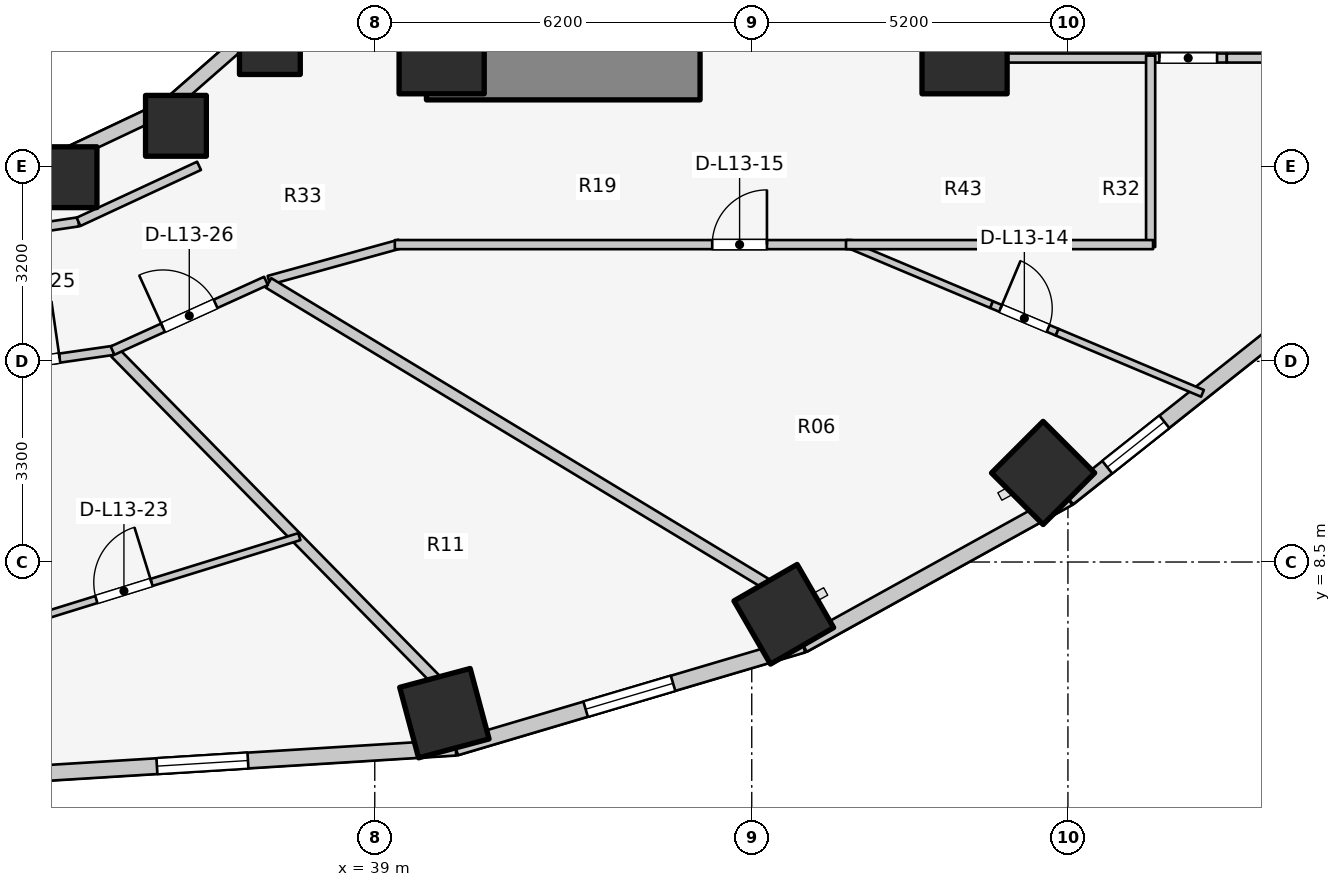
"""IFC4 building model, lengths in metres.
Left out: names, types, materials, properties, quantities, classifications, styles, units other than length and angle.
Written with IfcOpenShell. Run it as: python <this file> out.ifc"""

import sys

from ifc_helpers import new_model, si_unit, direction, frame, frame_2d, origin, origin_2d, place, context, subcontext, project, spatial, rectangle, extrude, element, fill, save


model = new_model("IFC4")
c1 = context("Model", 3, precision=1e-05, world=origin(), true_north=direction((0.0, 1.0)))
c2 = subcontext(c1, "Body", "Model", "MODEL_VIEW")
j1 = project(units=[si_unit("LENGTHUNIT", "METRE"), si_unit("PLANEANGLEUNIT", "RADIAN")], contexts=[c1])
p1 = place(None, origin())
s1 = spatial("IfcSite", under=j1, at=p1, CompositionType="ELEMENT")
p2 = place(p1, origin())
s2 = spatial("IfcBuilding", under=s1, at=p2, CompositionType="ELEMENT")
p3 = place(p2, frame((0.0, 0.0, 46.2)))
s3 = spatial("IfcBuildingStorey", under=s2, at=p3, CompositionType="ELEMENT", Elevation=46.2)
p4 = place(p3, frame((39.85, 16.55, 0.0), z_axis=(0.0, 0.0, 1.0), x_axis=(1.0, 0.0, 0.0)))
e1 = element("IfcWall", 1, at=p4, inside=s3, PredefinedType="SHEAR", context=c2, shape_type="SweptSolid", body=[
    extrude(rectangle(XDim=4.5, YDim=0.9, at=frame_2d((2.25, 0.0))), origin(), (0.0, 0.0, 1.0), 3.1),
])
for number, where, z_axis, x_axis in (
    (2, (40.1, 16.9, 0.0), (0.0, 0.0, 1.0), (1.0, 0.0, 0.0)),
    (3, (48.7, 16.9, 0.0), (0.0, 0.0, 1.0), (1.0, 0.0, 0.0)),
):
    element("IfcColumn", number, at=place(p3, frame(where, z_axis=z_axis, x_axis=x_axis)), inside=s3, PredefinedType="COLUMN", context=c2, shape_type="SweptSolid", body=[
        extrude(rectangle(XDim=1.4, YDim=1.4, at=origin_2d()), origin(), (0.0, 0.0, 1.0), 3.1),
    ])
p5 = place(p3, frame((33.931, 14.828, 0.0), z_axis=(0.0, 0.0, 1.0), x_axis=(1.0, 0.0, 0.0)))
e4 = element("IfcColumn", 4, at=p5, inside=s3, PredefinedType="COLUMN", context=c2, shape_type="SweptSolid", body=[
    extrude(rectangle(XDim=1.0, YDim=1.0, at=origin_2d()), origin(), (0.0, 0.0, 1.0), 3.1),
])
p6 = place(p3, frame((40.145, 6.014, 0.0), z_axis=(0.0, 0.0, 1.0), x_axis=(0.258819045103, -0.965925826289, 0.0)))
e5 = element("IfcColumn", 5, at=p6, inside=s3, PredefinedType="COLUMN", context=c2, shape_type="SweptSolid", body=[
    extrude(rectangle(XDim=1.2, YDim=1.2, at=origin_2d()), origin(), (0.0, 0.0, 1.0), 3.1),
])
p7 = place(p3, frame((35.73, 15.673, 0.0), z_axis=(0.0, 0.0, 1.0), x_axis=(1.0, 0.0, 0.0)))
e6 = element("IfcColumn", 6, at=p7, inside=s3, PredefinedType="COLUMN", context=c2, shape_type="SweptSolid", body=[
    extrude(rectangle(XDim=1.0, YDim=1.0, at=origin_2d()), origin(), (0.0, 0.0, 1.0), 3.1),
])
p8 = place(p3, frame((45.727, 7.641, 0.0), z_axis=(0.0, 0.0, 1.0), x_axis=(0.5, -0.866025403784, 0.0)))
e7 = element("IfcColumn", 7, at=p8, inside=s3, PredefinedType="COLUMN", context=c2, shape_type="SweptSolid", body=[
    extrude(rectangle(XDim=1.2, YDim=1.2, at=origin_2d()), origin(), (0.0, 0.0, 1.0), 3.1),
])
p9 = place(p3, frame((37.275, 17.018, 0.0), z_axis=(0.0, 0.0, 1.0), x_axis=(1.0, 0.0, 0.0)))
e8 = element("IfcColumn", 8, at=p9, inside=s3, PredefinedType="COLUMN", context=c2, shape_type="SweptSolid", body=[
    extrude(rectangle(XDim=1.0, YDim=1.0, at=origin_2d()), origin(), (0.0, 0.0, 1.0), 3.1),
])
p10 = place(p3, frame((49.992, 9.965, 0.0), z_axis=(0.0, 0.0, 1.0), x_axis=(0.707106781187, -0.707106781187, 0.0)))
e9 = element("IfcColumn", 9, at=p10, inside=s3, PredefinedType="COLUMN", context=c2, shape_type="SweptSolid", body=[
    extrude(rectangle(XDim=1.2, YDim=1.2, at=origin_2d()), origin(), (0.0, 0.0, 1.0), 3.1),
])
p11 = place(p3, frame((32.0, 14.88, 0.0), z_axis=(0.0, 0.0, 1.0), x_axis=(0.988901730308, 0.148571086668, 0.0)))
e10 = element("IfcWall", 10, at=p11, inside=s3, PredefinedType="STANDARD", context=c2, shape_type="SweptSolid", body=[
    extrude(rectangle(XDim=1.864, YDim=0.23, at=frame_2d((0.932, 0.0))), origin(), (0.0, 0.0, 1.0), 2.16),
])
p12 = place(p3, frame((33.843, 15.157, 0.0), z_axis=(0.0, 0.0, 1.0), x_axis=(0.904179699603, 0.427152280606, 0.0)))
e11 = element("IfcWall", 11, at=p12, inside=s3, PredefinedType="STANDARD", context=c2, shape_type="SweptSolid", body=[
    extrude(rectangle(XDim=1.899, YDim=0.23, at=frame_2d((0.95, 0.0))), origin(), (0.0, 0.0, 1.0), 2.16),
])
p13 = place(p3, frame((35.56, 15.968, 0.0), z_axis=(0.0, 0.0, 1.0), x_axis=(0.752576694707, 0.658504607869, 0.0)))
e12 = element("IfcWall", 12, at=p13, inside=s3, PredefinedType="STANDARD", context=c2, shape_type="SweptSolid", body=[
    extrude(rectangle(XDim=1.959, YDim=0.23, at=frame_2d((0.98, 0.0))), origin(), (0.0, 0.0, 1.0), 2.16),
])
p14 = place(p3, frame((32.0, 4.931, 0.0), z_axis=(0.0, 0.0, 1.0), x_axis=(0.998090514779, 0.061768311519, 0.0)))
e13 = element("IfcWall", 13, at=p14, inside=s3, PredefinedType="STANDARD", context=c2, shape_type="SweptSolid", body=[
    extrude(rectangle(XDim=8.348, YDim=0.26, at=frame_2d((4.174, 0.0))), origin(), (0.0, 0.0, 1.0), 2.85),
])
p15 = place(p14, frame((3.424, 0.0, 0.75)))
e14 = element("IfcOpeningElement", 14, at=p15, cuts=e13, PredefinedType="OPENING", context=c2, shape_type="SweptSolid", body=[
    extrude(rectangle(XDim=1.5, YDim=1.6, at=frame_2d((0.75, 0.8))), frame((0.0, 0.14, 0.0), z_axis=(0.0, -1.0, 0.0), x_axis=(1.0, 0.0, 0.0)), (0.0, 0.0, 1.0), 0.28),
])
p16 = place(p3, frame((40.332, 5.447, 0.0), z_axis=(0.0, 0.0, 1.0), x_axis=(0.958843593522, 0.283934786811, 0.0)))
e15 = element("IfcWall", 15, at=p16, inside=s3, PredefinedType="STANDARD", context=c2, shape_type="SweptSolid", body=[
    extrude(rectangle(XDim=5.955, YDim=0.26, at=frame_2d((2.978, 0.0))), origin(), (0.0, 0.0, 1.0), 2.85),
])
p17 = place(p16, frame((2.228, 0.0, 0.75)))
e16 = element("IfcOpeningElement", 16, at=p17, cuts=e15, PredefinedType="OPENING", context=c2, shape_type="SweptSolid", body=[
    extrude(rectangle(XDim=1.5, YDim=1.6, at=frame_2d((0.75, 0.8))), frame((0.0, 0.14, 0.0), z_axis=(0.0, -1.0, 0.0), x_axis=(1.0, 0.0, 0.0)), (0.0, 0.0, 1.0), 0.28),
])
p18 = place(p3, frame((46.042, 7.138, 0.0), z_axis=(0.0, 0.0, 1.0), x_axis=(0.875137303239, 0.483874674352, 0.0)))
e17 = element("IfcWall", 17, at=p18, inside=s3, PredefinedType="STANDARD", context=c2, shape_type="SweptSolid", body=[
    extrude(rectangle(XDim=4.985, YDim=0.26, at=frame_2d((2.493, 0.0))), origin(), (0.0, 0.0, 1.0), 2.85),
])
p19 = place(p3, frame((50.405, 9.55, 0.0), z_axis=(0.0, 0.0, 1.0), x_axis=(0.783123133379, 0.621866672179, 0.0)))
e18 = element("IfcWall", 18, at=p19, inside=s3, PredefinedType="STANDARD", context=c2, shape_type="SweptSolid", body=[
    extrude(rectangle(XDim=4.839, YDim=0.26, at=frame_2d((2.419, 0.0))), origin(), (0.0, 0.0, 1.0), 2.85),
])
p20 = place(p19, frame((0.819, 0.0, 0.75)))
e19 = element("IfcOpeningElement", 19, at=p20, cuts=e18, PredefinedType="OPENING", context=c2, shape_type="SweptSolid", body=[
    extrude(rectangle(XDim=1.2, YDim=1.5, at=frame_2d((0.6, 0.75))), frame((0.0, 0.14, 0.0), z_axis=(0.0, -1.0, 0.0), x_axis=(1.0, 0.0, 0.0)), (0.0, 0.0, 1.0), 0.28),
])
p21 = place(p3, frame((32.0, 13.78, 0.0), z_axis=(0.0, 0.0, 1.0), x_axis=(0.989268584896, 0.146108408166, 0.0)))
e20 = element("IfcWall", 20, at=p21, inside=s3, PredefinedType="PARTITIONING", context=c2, shape_type="SweptSolid", body=[
    extrude(rectangle(XDim=2.151, YDim=0.15, at=frame_2d((1.075, 0.0))), origin(), (0.0, 0.0, 1.0), 2.237),
])
p22 = place(p3, frame((34.127, 14.094, 0.0), z_axis=(0.0, 0.0, 1.0), x_axis=(0.906943449489, 0.421252393975, 0.0)))
e21 = element("IfcWall", 21, at=p22, inside=s3, PredefinedType="PARTITIONING", context=c2, shape_type="SweptSolid", body=[
    extrude(rectangle(XDim=2.186, YDim=0.15, at=frame_2d((1.093, 0.0))), origin(), (0.0, 0.0, 1.0), 2.237),
])
p23 = place(p3, frame((48.95, 16.788, 0.0), z_axis=(0.0, 0.0, 1.0), x_axis=(1.0, 0.0, 0.0)))
e22 = element("IfcWall", 22, at=p23, inside=s3, PredefinedType="PARTITIONING", context=c2, shape_type="SweptSolid", body=[
    extrude(rectangle(XDim=2.793, YDim=0.15, at=frame_2d((1.396, 0.0))), origin(), (0.0, 0.0, 1.0), 2.069),
])
p24 = place(p3, frame((51.743, 16.788, 0.0), z_axis=(0.0, 0.0, 1.0), x_axis=(1.0, 0.0, 0.0)))
e23 = element("IfcWall", 23, at=p24, inside=s3, PredefinedType="PARTITIONING", context=c2, shape_type="SweptSolid", body=[
    extrude(rectangle(XDim=1.27, YDim=0.15, at=frame_2d((0.635, 0.0))), origin(), (0.0, 0.0, 1.0), 2.855),
])
p25 = place(p24, frame((0.16, 0.0, 0.0)))
e24 = element("IfcOpeningElement", 24, at=p25, cuts=e23, PredefinedType="OPENING", context=c2, shape_type="SweptSolid", body=[
    extrude(rectangle(XDim=0.95, YDim=2.1, at=frame_2d((0.475, 1.05))), frame((0.0, 0.085, 0.0), z_axis=(0.0, -1.0, 0.0), x_axis=(1.0, 0.0, 0.0)), (0.0, 0.0, 1.0), 0.17),
])
p26 = place(p3, frame((53.013, 16.788, 0.0), z_axis=(0.0, 0.0, 1.0), x_axis=(1.0, 0.0, 0.0)))
e25 = element("IfcWall", 25, at=p26, inside=s3, PredefinedType="PARTITIONING", context=c2, shape_type="SweptSolid", body=[
    extrude(rectangle(XDim=3.973, YDim=0.15, at=frame_2d((1.987, 0.0))), origin(), (0.0, 0.0, 1.0), 2.855),
])
p27 = place(p3, frame((51.76, 13.68, 0.0), z_axis=(0.0, 0.0, 1.0), x_axis=(0.0, 1.0, 0.0)))
e26 = element("IfcWall", 26, at=p27, inside=s3, PredefinedType="PARTITIONING", context=c2, shape_type="SweptSolid", body=[
    extrude(rectangle(XDim=3.148, YDim=0.15, at=frame_2d((1.574, 0.0))), origin(), (0.0, 0.0, 1.0), 2.855),
])
p28 = place(p3, frame((46.754, 13.74, 0.0), z_axis=(0.0, 0.0, 1.0), x_axis=(0.921672585584, -0.3879686134, 0.0)))
e27 = element("IfcWall", 27, at=p28, inside=s3, PredefinedType="MOVABLE", context=c2, shape_type="SweptSolid", body=[
    extrude(rectangle(XDim=2.593, YDim=0.12, at=frame_2d((1.297, 0.0))), origin(), (0.0, 0.0, 1.0), 2.855),
])
p29 = place(p3, frame((49.144, 12.733, 0.0), z_axis=(0.0, 0.0, 1.0), x_axis=(0.92176888, -0.387739773384, 0.0)))
e28 = element("IfcWall", 28, at=p29, inside=s3, PredefinedType="MOVABLE", context=c2, shape_type="SweptSolid", body=[
    extrude(rectangle(XDim=1.17, YDim=0.12, at=frame_2d((0.585, 0.0))), origin(), (0.0, 0.0, 1.0), 2.11),
])
p30 = place(p29, frame((0.16, 0.0, 0.0)))
e29 = element("IfcOpeningElement", 29, at=p30, cuts=e28, PredefinedType="OPENING", context=c2, shape_type="SweptSolid", body=[
    extrude(rectangle(XDim=0.85, YDim=2.05, at=frame_2d((0.425, 1.025))), frame((0.0, 0.07, 0.0), z_axis=(0.0, -1.0, 0.0), x_axis=(1.0, 0.0, 0.0)), (0.0, 0.0, 1.0), 0.14),
])
p31 = place(p3, frame((50.222, 12.28, 0.0), z_axis=(0.0, 0.0, 1.0), x_axis=(0.921706247461, -0.387888635295, 0.0)))
e30 = element("IfcWall", 30, at=p31, inside=s3, PredefinedType="MOVABLE", context=c2, shape_type="SweptSolid", body=[
    extrude(rectangle(XDim=2.593, YDim=0.12, at=frame_2d((1.297, 0.0))), origin(), (0.0, 0.0, 1.0), 2.855),
])
p32 = place(p3, frame((37.258, 13.133, 0.0), z_axis=(0.0, 0.0, 1.0), x_axis=(0.963833843713, 0.266503886865, 0.0)))
e31 = element("IfcWall", 31, at=p32, inside=s3, PredefinedType="PARTITIONING", context=c2, shape_type="SweptSolid", body=[
    extrude(rectangle(XDim=2.232, YDim=0.15, at=frame_2d((1.116, 0.0))), origin(), (0.0, 0.0, 1.0), 2.237),
])
p33 = place(p3, frame((39.33, 13.72, 0.0), z_axis=(0.0, 0.0, 1.0), x_axis=(1.0, 0.0, 0.0)))
e32 = element("IfcWall", 32, at=p33, inside=s3, PredefinedType="PARTITIONING", context=c2, shape_type="SweptSolid", body=[
    extrude(rectangle(XDim=7.52, YDim=0.15, at=frame_2d((3.76, 0.0))), origin(), (0.0, 0.0, 1.0), 2.237),
])
p34 = place(p33, frame((5.22, 0.0, 0.0)))
e33 = element("IfcOpeningElement", 33, at=p34, cuts=e32, PredefinedType="OPENING", context=c2, shape_type="SweptSolid", body=[
    extrude(rectangle(XDim=0.9, YDim=2.1, at=frame_2d((0.45, 1.05))), frame((0.0, 0.085, 0.0), z_axis=(0.0, -1.0, 0.0), x_axis=(1.0, 0.0, 0.0)), (0.0, 0.0, 1.0), 0.17),
])
p35 = place(p3, frame((46.75, 13.72, 0.0), z_axis=(0.0, 0.0, 1.0), x_axis=(1.0, 0.0, 0.0)))
e34 = element("IfcWall", 34, at=p35, inside=s3, PredefinedType="PARTITIONING", context=c2, shape_type="SweptSolid", body=[
    extrude(rectangle(XDim=5.05, YDim=0.15, at=frame_2d((2.525, 0.0))), origin(), (0.0, 0.0, 1.0), 2.069),
])
p36 = place(p3, frame((34.733, 11.939, 0.0), z_axis=(0.0, 0.0, 1.0), x_axis=(0.700234780085, -0.713912636644, 0.0)))
e35 = element("IfcWall", 35, at=p36, inside=s3, PredefinedType="PARTITIONING", context=c2, shape_type="SweptSolid", body=[
    extrude(rectangle(XDim=7.515, YDim=0.18, at=frame_2d((3.757, 0.0))), origin(), (0.0, 0.0, 1.0), 2.237),
])
p37 = place(p3, frame((37.252, 13.09, 0.0), z_axis=(0.0, 0.0, 1.0), x_axis=(0.855817136021, -0.517278483694, 0.0)))
e36 = element("IfcWall", 36, at=p37, inside=s3, PredefinedType="PARTITIONING", context=c2, shape_type="SweptSolid", body=[
    extrude(rectangle(XDim=9.564, YDim=0.18, at=frame_2d((4.782, 0.0))), origin(), (0.0, 0.0, 1.0), 2.237),
])
p38 = place(p3, frame((31.99, 7.13, 0.0), z_axis=(0.0, 0.0, 1.0), x_axis=(0.955191504197, 0.29598849692, 0.0)))
e37 = element("IfcWall", 37, at=p38, inside=s3, PredefinedType="MOVABLE", context=c2, shape_type="SweptSolid", body=[
    extrude(rectangle(XDim=6.039, YDim=0.12, at=frame_2d((3.02, 0.0))), origin(), (0.0, 0.0, 1.0), 2.237),
])
p39 = place(p38, frame((2.545, 0.0, 0.0)))
e38 = element("IfcOpeningElement", 38, at=p39, cuts=e37, PredefinedType="OPENING", context=c2, shape_type="SweptSolid", body=[
    extrude(rectangle(XDim=0.95, YDim=2.1, at=frame_2d((0.475, 1.05))), frame((0.0, 0.07, 0.0), z_axis=(0.0, -1.0, 0.0), x_axis=(1.0, 0.0, 0.0)), (0.0, 0.0, 1.0), 0.14),
])
p40 = place(p3, frame((31.993, 11.59, 0.0), z_axis=(0.0, 0.0, 1.0), x_axis=(0.989748682384, 0.142819976611, 0.0)))
e39 = element("IfcWall", 39, at=p40, inside=s3, PredefinedType="PARTITIONING", context=c2, shape_type="SweptSolid", body=[
    extrude(rectangle(XDim=2.737, YDim=0.15, at=frame_2d((1.368, 0.0))), origin(), (0.0, 0.0, 1.0), 2.237),
])
p41 = place(p40, frame((0.893, 0.0, 0.0)))
e40 = element("IfcOpeningElement", 40, at=p41, cuts=e39, PredefinedType="OPENING", context=c2, shape_type="SweptSolid", body=[
    extrude(rectangle(XDim=0.95, YDim=2.1, at=frame_2d((0.475, 1.05))), frame((0.0, 0.085, 0.0), z_axis=(0.0, -1.0, 0.0), x_axis=(1.0, 0.0, 0.0)), (0.0, 0.0, 1.0), 0.17),
])
p42 = place(p3, frame((34.687, 11.977, 0.0), z_axis=(0.0, 0.0, 1.0), x_axis=(0.910568469686, 0.41335827319, 0.0)))
e41 = element("IfcWall", 41, at=p42, inside=s3, PredefinedType="PARTITIONING", context=c2, shape_type="SweptSolid", body=[
    extrude(rectangle(XDim=2.772, YDim=0.15, at=frame_2d((1.386, 0.0))), origin(), (0.0, 0.0, 1.0), 2.237),
])
p43 = place(p42, frame((0.911, 0.0, 0.0)))
e42 = element("IfcOpeningElement", 42, at=p43, cuts=e41, PredefinedType="OPENING", context=c2, shape_type="SweptSolid", body=[
    extrude(rectangle(XDim=0.95, YDim=2.1, at=frame_2d((0.475, 1.05))), frame((0.0, 0.085, 0.0), z_axis=(0.0, -1.0, 0.0), x_axis=(1.0, 0.0, 0.0)), (0.0, 0.0, 1.0), 0.17),
])
p44 = place(p15, origin())
e43 = element("IfcWindow", 43, at=p44, inside=s3, PartitioningType="SINGLE_PANEL", PredefinedType="WINDOW", context=c2, shape_type="SweptSolid", body=[
    extrude(rectangle(XDim=1.5, YDim=1.6, at=frame_2d((0.75, 0.8))), frame((0.0, 0.03, 0.0), z_axis=(0.0, -1.0, 0.0), x_axis=(1.0, 0.0, 0.0)), (0.0, 0.0, 1.0), 0.06),
])
fill(e14, e43)
p45 = place(p17, origin())
e44 = element("IfcWindow", 44, at=p45, inside=s3, PartitioningType="SINGLE_PANEL", PredefinedType="WINDOW", context=c2, shape_type="SweptSolid", body=[
    extrude(rectangle(XDim=1.5, YDim=1.6, at=frame_2d((0.75, 0.8))), frame((0.0, 0.03, 0.0), z_axis=(0.0, -1.0, 0.0), x_axis=(1.0, 0.0, 0.0)), (0.0, 0.0, 1.0), 0.06),
])
fill(e16, e44)
p46 = place(p20, origin())
e45 = element("IfcWindow", 45, at=p46, inside=s3, PartitioningType="SINGLE_PANEL", PredefinedType="WINDOW", context=c2, shape_type="SweptSolid", body=[
    extrude(rectangle(XDim=1.2, YDim=1.5, at=frame_2d((0.6, 0.75))), frame((0.0, 0.03, 0.0), z_axis=(0.0, -1.0, 0.0), x_axis=(1.0, 0.0, 0.0)), (0.0, 0.0, 1.0), 0.06),
])
fill(e19, e45)
p47 = place(p25, origin())
e46 = element("IfcDoor", 46, at=p47, inside=s3, OperationType="SINGLE_SWING_LEFT", PredefinedType="DOOR", context=c2, shape_type="SweptSolid", body=[
    extrude(rectangle(XDim=0.95, YDim=2.1, at=frame_2d((0.475, 1.05))), frame((0.0, 0.025, 0.0), z_axis=(0.0, -1.0, 0.0), x_axis=(1.0, 0.0, 0.0)), (0.0, 0.0, 1.0), 0.05),
])
fill(e24, e46)
p48 = place(p30, origin())
e47 = element("IfcDoor", 47, at=p48, inside=s3, OperationType="SINGLE_SWING_LEFT", PredefinedType="DOOR", context=c2, shape_type="SweptSolid", body=[
    extrude(rectangle(XDim=0.85, YDim=2.05, at=frame_2d((0.425, 1.025))), frame((0.0, 0.025, 0.0), z_axis=(0.0, -1.0, 0.0), x_axis=(1.0, 0.0, 0.0)), (0.0, 0.0, 1.0), 0.05),
])
fill(e29, e47)
p49 = place(p34, origin())
e48 = element("IfcDoor", 48, at=p49, inside=s3, OperationType="SINGLE_SWING_RIGHT", PredefinedType="DOOR", context=c2, shape_type="SweptSolid", body=[
    extrude(rectangle(XDim=0.9, YDim=2.1, at=frame_2d((0.45, 1.05))), frame((0.0, 0.025, 0.0), z_axis=(0.0, -1.0, 0.0), x_axis=(1.0, 0.0, 0.0)), (0.0, 0.0, 1.0), 0.05),
])
fill(e33, e48)
p50 = place(p39, origin())
e49 = element("IfcDoor", 49, at=p50, inside=s3, OperationType="SINGLE_SWING_RIGHT", PredefinedType="DOOR", context=c2, shape_type="SweptSolid", body=[
    extrude(rectangle(XDim=0.95, YDim=2.1, at=frame_2d((0.475, 1.05))), frame((0.0, 0.025, 0.0), z_axis=(0.0, -1.0, 0.0), x_axis=(1.0, 0.0, 0.0)), (0.0, 0.0, 1.0), 0.05),
])
fill(e38, e49)
p51 = place(p41, origin())
e50 = element("IfcDoor", 50, at=p51, inside=s3, OperationType="SINGLE_SWING_RIGHT", PredefinedType="DOOR", context=c2, shape_type="SweptSolid", body=[
    extrude(rectangle(XDim=0.95, YDim=2.1, at=frame_2d((0.475, 1.05))), frame((0.0, 0.025, 0.0), z_axis=(0.0, -1.0, 0.0), x_axis=(1.0, 0.0, 0.0)), (0.0, 0.0, 1.0), 0.05),
])
fill(e40, e50)
p52 = place(p43, origin())
e51 = element("IfcDoor", 51, at=p52, inside=s3, OperationType="SINGLE_SWING_LEFT", PredefinedType="DOOR", context=c2, shape_type="SweptSolid", body=[
    extrude(rectangle(XDim=0.95, YDim=2.1, at=frame_2d((0.475, 1.05))), frame((0.0, 0.025, 0.0), z_axis=(0.0, -1.0, 0.0), x_axis=(1.0, 0.0, 0.0)), (0.0, 0.0, 1.0), 0.05),
])
fill(e42, e51)
save(model, sys.argv[1])
